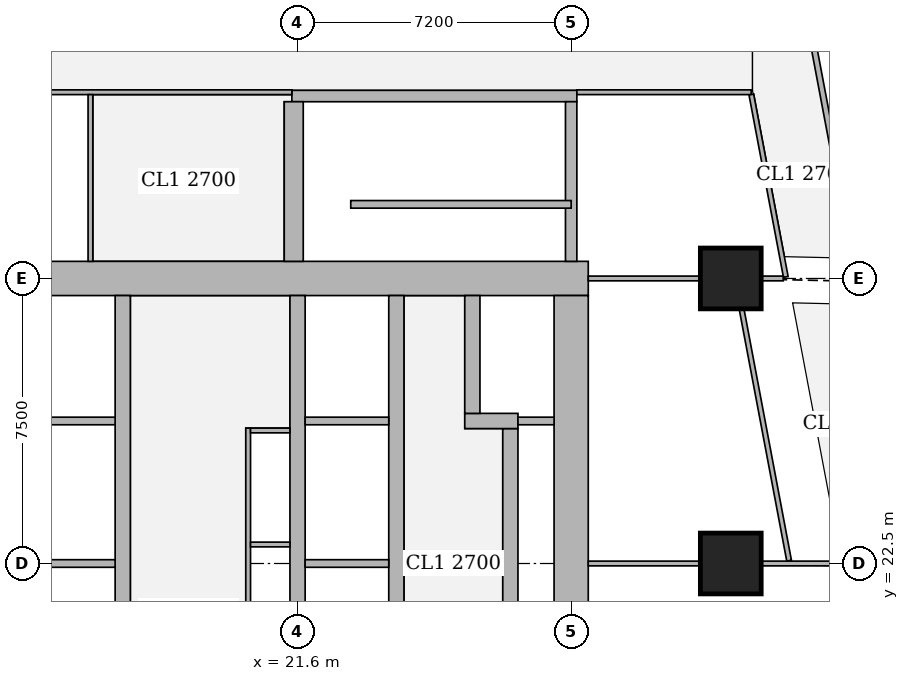
"""IFC4 building model, lengths in metres.
Left out: names, types, materials, properties, quantities, classifications, styles, units other than length and angle.
Written with IfcOpenShell. Run it as: python <this file> out.ifc"""

import sys

from ifc_helpers import new_model, si_unit, direction, frame, frame_2d, origin, origin_2d, place, context, subcontext, project, spatial, rectangle, extrude, element, fill, save


model = new_model("IFC4")
c1 = context("Model", 3, precision=1e-05, world=origin(), true_north=direction((0.0, 1.0)))
c2 = subcontext(c1, "Body", "Model", "MODEL_VIEW")
j1 = project(units=[si_unit("LENGTHUNIT", "METRE"), si_unit("PLANEANGLEUNIT", "RADIAN")], contexts=[c1])
p1 = place(None, origin())
s1 = spatial("IfcSite", under=j1, at=p1, CompositionType="ELEMENT")
p2 = place(p1, origin())
s2 = spatial("IfcBuilding", under=s1, at=p2, CompositionType="ELEMENT")
p3 = place(p2, frame((0.0, 0.0, 81.65)))
s3 = spatial("IfcBuildingStorey", under=s2, at=p3, CompositionType="ELEMENT", Elevation=81.65)
for number, where, z_axis, x_axis in (
    (1, (33.0, 22.5, 0.0), (0.0, 0.0, 1.0), (1.0, 0.0, 0.0)),
    (2, (33.0, 30.0, 0.0), (0.0, 0.0, 1.0), (1.0, 0.0, 0.0)),
):
    element("IfcColumn", number, at=place(p3, frame(where, z_axis=z_axis, x_axis=x_axis)), inside=s3, PredefinedType="COLUMN", context=c2, shape_type="SweptSolid", body=[
        extrude(rectangle(XDim=1.6, YDim=1.6, at=origin_2d()), origin(), (0.0, 0.0, 1.0), 3.75),
    ])
p4 = place(p3, frame((13.95, 30.0, 0.0), z_axis=(0.0, 0.0, 1.0), x_axis=(1.0, 0.0, 0.0)))
e3 = element("IfcWall", 3, at=p4, inside=s3, PredefinedType="SHEAR", context=c2, shape_type="SweptSolid", body=[
    extrude(rectangle(XDim=15.3, YDim=0.9, at=frame_2d((7.65, 0.0))), origin(), (0.0, 0.0, 1.0), 3.75),
])
p5 = place(p4, frame((4.45, 0.0, 0.0)))
e4 = element("IfcOpeningElement", 4, at=p5, cuts=e3, PredefinedType="OPENING", context=c2, shape_type="SweptSolid", body=[
    extrude(rectangle(XDim=1.8, YDim=2.1, at=frame_2d((0.9, 1.05))), frame((0.0, 0.46, 0.0), z_axis=(0.0, -1.0, 0.0), x_axis=(1.0, 0.0, 0.0)), (0.0, 0.0, 1.0), 0.92),
])
p6 = place(p4, frame((10.7, 0.0, 0.0)))
e5 = element("IfcOpeningElement", 5, at=p6, cuts=e3, PredefinedType="OPENING", context=c2, shape_type="SweptSolid", body=[
    extrude(rectangle(XDim=1.1, YDim=2.1, at=frame_2d((0.55, 1.05))), frame((0.0, 0.46, 0.0), z_axis=(0.0, -1.0, 0.0), x_axis=(1.0, 0.0, 0.0)), (0.0, 0.0, 1.0), 0.92),
])
p7 = place(p3, frame((28.8, 15.45, 0.0), z_axis=(0.0, 0.0, 1.0), x_axis=(0.0, 1.0, 0.0)))
e6 = element("IfcWall", 6, at=p7, inside=s3, PredefinedType="SHEAR", context=c2, shape_type="SweptSolid", body=[
    extrude(rectangle(XDim=14.1, YDim=0.9, at=frame_2d((7.05, 0.0))), origin(), (0.0, 0.0, 1.0), 3.75),
])
p8 = place(p3, frame((17.0, 15.45, 0.0), z_axis=(0.0, 0.0, 1.0), x_axis=(0.0, 1.0, 0.0)))
e7 = element("IfcWall", 7, at=p8, inside=s3, PredefinedType="SHEAR", context=c2, shape_type="SweptSolid", body=[
    extrude(rectangle(XDim=14.1, YDim=0.4, at=frame_2d((7.05, 0.0))), origin(), (0.0, 0.0, 1.0), 3.75),
])
p9 = place(p8, frame((0.875, 0.0, 0.0)))
e8 = element("IfcOpeningElement", 8, at=p9, cuts=e7, PredefinedType="OPENING", context=c2, shape_type="SweptSolid", body=[
    extrude(rectangle(XDim=1.1, YDim=2.1, at=frame_2d((0.55, 1.05))), frame((0.0, 0.21, 0.0), z_axis=(0.0, -1.0, 0.0), x_axis=(1.0, 0.0, 0.0)), (0.0, 0.0, 1.0), 0.42),
])
p10 = place(p8, frame((4.625, 0.0, 0.0)))
e9 = element("IfcOpeningElement", 9, at=p10, cuts=e7, PredefinedType="OPENING", context=c2, shape_type="SweptSolid", body=[
    extrude(rectangle(XDim=1.1, YDim=2.1, at=frame_2d((0.55, 1.05))), frame((0.0, 0.21, 0.0), z_axis=(0.0, -1.0, 0.0), x_axis=(1.0, 0.0, 0.0)), (0.0, 0.0, 1.0), 0.42),
])
p11 = place(p8, frame((8.375, 0.0, 0.0)))
e10 = element("IfcOpeningElement", 10, at=p11, cuts=e7, PredefinedType="OPENING", context=c2, shape_type="SweptSolid", body=[
    extrude(rectangle(XDim=1.1, YDim=2.1, at=frame_2d((0.55, 1.05))), frame((0.0, 0.21, 0.0), z_axis=(0.0, -1.0, 0.0), x_axis=(1.0, 0.0, 0.0)), (0.0, 0.0, 1.0), 0.42),
])
p12 = place(p8, frame((12.125, 0.0, 0.0)))
e11 = element("IfcOpeningElement", 11, at=p12, cuts=e7, PredefinedType="OPENING", context=c2, shape_type="SweptSolid", body=[
    extrude(rectangle(XDim=1.1, YDim=2.1, at=frame_2d((0.55, 1.05))), frame((0.0, 0.21, 0.0), z_axis=(0.0, -1.0, 0.0), x_axis=(1.0, 0.0, 0.0)), (0.0, 0.0, 1.0), 0.42),
])
for number, where, z_axis, x_axis in (
    (12, (21.6, 15.45, 0.0), (0.0, 0.0, 1.0), (0.0, 1.0, 0.0)),
    (13, (24.2, 15.45, 0.0), (0.0, 0.0, 1.0), (0.0, 1.0, 0.0)),
):
    element("IfcWall", number, at=place(p3, frame(where, z_axis=z_axis, x_axis=x_axis)), inside=s3, PredefinedType="SHEAR", context=c2, shape_type="SweptSolid", body=[
        extrude(rectangle(XDim=14.1, YDim=0.4, at=frame_2d((7.05, 0.0))), origin(), (0.0, 0.0, 1.0), 3.75),
    ])
p13 = place(p3, frame((27.2, 18.95, 0.0), z_axis=(0.0, 0.0, 1.0), x_axis=(0.0, 1.0, 0.0)))
e14 = element("IfcWall", 14, at=p13, inside=s3, PredefinedType="SHEAR", context=c2, shape_type="SweptSolid", body=[
    extrude(rectangle(XDim=7.1, YDim=0.4, at=frame_2d((3.55, 0.0))), origin(), (0.0, 0.0, 1.0), 3.75),
])
p14 = place(p3, frame((26.0, 26.25, 0.0), z_axis=(0.0, 0.0, 1.0), x_axis=(1.0, 0.0, 0.0)))
e15 = element("IfcWall", 15, at=p14, inside=s3, PredefinedType="SHEAR", context=c2, shape_type="SweptSolid", body=[
    extrude(rectangle(XDim=1.4, YDim=0.4, at=frame_2d((0.7, 0.0))), origin(), (0.0, 0.0, 1.0), 3.75),
])
p15 = place(p3, frame((26.2, 26.45, 0.0), z_axis=(0.0, 0.0, 1.0), x_axis=(0.0, 1.0, 0.0)))
e16 = element("IfcWall", 16, at=p15, inside=s3, PredefinedType="SHEAR", context=c2, shape_type="SweptSolid", body=[
    extrude(rectangle(XDim=3.1, YDim=0.4, at=frame_2d((1.55, 0.0))), origin(), (0.0, 0.0, 1.0), 3.75),
])
p16 = place(p15, frame((1.075, 0.0, 0.0)))
e17 = element("IfcOpeningElement", 17, at=p16, cuts=e16, PredefinedType="OPENING", context=c2, shape_type="SweptSolid", body=[
    extrude(rectangle(XDim=1.2, YDim=2.1, at=frame_2d((0.6, 1.05))), frame((0.0, 0.21, 0.0), z_axis=(0.0, -1.0, 0.0), x_axis=(1.0, 0.0, 0.0)), (0.0, 0.0, 1.0), 0.42),
])
p17 = place(p3, frame((21.45, 34.8, 0.0), z_axis=(0.0, 0.0, 1.0), x_axis=(1.0, 0.0, 0.0)))
e18 = element("IfcWall", 18, at=p17, inside=s3, PredefinedType="SHEAR", context=c2, shape_type="SweptSolid", body=[
    extrude(rectangle(XDim=7.5, YDim=0.3, at=frame_2d((3.75, 0.0))), origin(), (0.0, 0.0, 1.0), 3.75),
])
p18 = place(p17, frame((0.5, 0.0, 0.0)))
e19 = element("IfcOpeningElement", 19, at=p18, cuts=e18, PredefinedType="OPENING", context=c2, shape_type="SweptSolid", body=[
    extrude(rectangle(XDim=1.1, YDim=2.1, at=frame_2d((0.55, 1.05))), frame((0.0, 0.16, 0.0), z_axis=(0.0, -1.0, 0.0), x_axis=(1.0, 0.0, 0.0)), (0.0, 0.0, 1.0), 0.32),
])
p19 = place(p3, frame((21.5, 30.45, 0.0), z_axis=(0.0, 0.0, 1.0), x_axis=(0.0, 1.0, 0.0)))
e20 = element("IfcWall", 20, at=p19, inside=s3, PredefinedType="SHEAR", context=c2, shape_type="SweptSolid", body=[
    extrude(rectangle(XDim=4.2, YDim=0.5, at=frame_2d((2.1, 0.0))), origin(), (0.0, 0.0, 1.0), 3.75),
])
p20 = place(p3, frame((28.8, 30.45, 0.0), z_axis=(0.0, 0.0, 1.0), x_axis=(0.0, 1.0, 0.0)))
e21 = element("IfcWall", 21, at=p20, inside=s3, PredefinedType="SHEAR", context=c2, shape_type="SweptSolid", body=[
    extrude(rectangle(XDim=4.2, YDim=0.3, at=frame_2d((2.1, 0.0))), origin(), (0.0, 0.0, 1.0), 3.75),
])
p21 = place(p3, frame((33.382, 45.65, 0.0), z_axis=(0.0, 0.0, 1.0), x_axis=(0.185593544777, -0.982626600565, 0.0)))
e22 = element("IfcWall", 22, at=p21, inside=s3, PredefinedType="SOLIDWALL", context=c2, shape_type="SweptSolid", body=[
    extrude(rectangle(XDim=47.118, YDim=0.15, at=frame_2d((23.559, 0.0))), origin(), (0.0, 0.0, 1.0), 2.2),
])
p22 = place(p21, frame((19.054, 0.0, 0.0)))
e23 = element("IfcOpeningElement", 23, at=p22, cuts=e22, PredefinedType="OPENING", context=c2, shape_type="SweptSolid", body=[
    extrude(rectangle(XDim=1.0, YDim=2.1, at=frame_2d((0.5, 1.05))), frame((0.0, 0.085, 0.0), z_axis=(0.0, -1.0, 0.0), x_axis=(1.0, 0.0, 0.0)), (0.0, 0.0, 1.0), 0.17),
])
p23 = place(p21, frame((22.87, 0.0, 0.0)))
e24 = element("IfcOpeningElement", 24, at=p23, cuts=e22, PredefinedType="OPENING", context=c2, shape_type="SweptSolid", body=[
    extrude(rectangle(XDim=1.0, YDim=2.1, at=frame_2d((0.5, 1.05))), frame((0.0, 0.085, 0.0), z_axis=(0.0, -1.0, 0.0), x_axis=(1.0, 0.0, 0.0)), (0.0, 0.0, 1.0), 0.17),
])
p24 = place(p21, frame((33.833, 0.0, 0.0)))
e25 = element("IfcOpeningElement", 25, at=p24, cuts=e22, PredefinedType="OPENING", context=c2, shape_type="SweptSolid", body=[
    extrude(rectangle(XDim=1.0, YDim=2.1, at=frame_2d((0.5, 1.05))), frame((0.0, 0.085, 0.0), z_axis=(0.0, -1.0, 0.0), x_axis=(1.0, 0.0, 0.0)), (0.0, 0.0, 1.0), 0.17),
])
p25 = place(p3, frame((10.163, 34.9, 0.0), z_axis=(0.0, 0.0, 1.0), x_axis=(1.0, 0.0, 0.0)))
e26 = element("IfcWall", 26, at=p25, inside=s3, PredefinedType="PARTITIONING", context=c2, shape_type="SweptSolid", body=[
    extrude(rectangle(XDim=11.287, YDim=0.125, at=frame_2d((5.644, 0.0))), origin(), (0.0, 0.0, 1.0), 3.5),
])
p26 = place(p25, frame((7.737, 0.0, 0.0)))
e27 = element("IfcOpeningElement", 27, at=p26, cuts=e26, PredefinedType="OPENING", context=c2, shape_type="SweptSolid", body=[
    extrude(rectangle(XDim=1.8, YDim=2.1, at=frame_2d((0.9, 1.05))), frame((0.0, 0.073, 0.0), z_axis=(0.0, -1.0, 0.0), x_axis=(1.0, 0.0, 0.0)), (0.0, 0.0, 1.0), 0.145),
])
p27 = place(p3, frame((16.15, 30.45, 0.0), z_axis=(0.0, 0.0, 1.0), x_axis=(0.0, 1.0, 0.0)))
e28 = element("IfcWall", 28, at=p27, inside=s3, PredefinedType="PARTITIONING", context=c2, shape_type="SweptSolid", body=[
    extrude(rectangle(XDim=4.387, YDim=0.125, at=frame_2d((2.193, 0.0))), origin(), (0.0, 0.0, 1.0), 3.5),
])
p28 = place(p27, frame((1.75, 0.0, 0.0)))
e29 = element("IfcOpeningElement", 29, at=p28, cuts=e28, PredefinedType="OPENING", context=c2, shape_type="SweptSolid", body=[
    extrude(rectangle(XDim=1.0, YDim=2.1, at=frame_2d((0.5, 1.05))), frame((0.0, 0.073, 0.0), z_axis=(0.0, -1.0, 0.0), x_axis=(1.0, 0.0, 0.0)), (0.0, 0.0, 1.0), 0.145),
])
p29 = place(p3, frame((28.95, 34.9, 0.0), z_axis=(0.0, 0.0, 1.0), x_axis=(1.0, 0.0, 0.0)))
e30 = element("IfcWall", 30, at=p29, inside=s3, PredefinedType="PARTITIONING", context=c2, shape_type="SweptSolid", body=[
    extrude(rectangle(XDim=4.588, YDim=0.125, at=frame_2d((2.294, 0.0))), origin(), (0.0, 0.0, 1.0), 3.5),
])
p30 = place(p3, frame((34.448, 30.04, 0.0), z_axis=(0.0, 0.0, 1.0), x_axis=(-0.185749459238, 0.982597139418, 0.0)))
e31 = element("IfcWall", 31, at=p30, inside=s3, PredefinedType="PARTITIONING", context=c2, shape_type="SweptSolid", body=[
    extrude(rectangle(XDim=4.883, YDim=0.125, at=frame_2d((2.441, 0.0))), origin(), (0.0, 0.0, 1.0), 2.5),
])
p31 = place(p30, frame((1.05, 0.0, 0.0)))
e32 = element("IfcOpeningElement", 32, at=p31, cuts=e31, PredefinedType="OPENING", context=c2, shape_type="SweptSolid", body=[
    extrude(rectangle(XDim=1.0, YDim=2.1, at=frame_2d((0.5, 1.05))), frame((0.0, 0.073, 0.0), z_axis=(0.0, -1.0, 0.0), x_axis=(1.0, 0.0, 0.0)), (0.0, 0.0, 1.0), 0.145),
])
p32 = place(p3, frame((34.535, 22.574, 0.0), z_axis=(0.0, 0.0, 1.0), x_axis=(-0.185591596381, 0.982626968566, 0.0)))
e33 = element("IfcWall", 33, at=p32, inside=s3, PredefinedType="PARTITIONING", context=c2, shape_type="SweptSolid", body=[
    extrude(rectangle(XDim=6.73, YDim=0.125, at=frame_2d((3.365, 0.0))), origin(), (0.0, 0.0, 1.0), 2.5),
])
p33 = place(p32, frame((3.241, 0.0, 0.0)))
e34 = element("IfcOpeningElement", 34, at=p33, cuts=e33, PredefinedType="OPENING", context=c2, shape_type="SweptSolid", body=[
    extrude(rectangle(XDim=1.0, YDim=2.1, at=frame_2d((0.5, 1.05))), frame((0.0, 0.073, 0.0), z_axis=(0.0, -1.0, 0.0), x_axis=(1.0, 0.0, 0.0)), (0.0, 0.0, 1.0), 0.145),
])
p34 = place(p3, frame((29.25, 22.5, 0.0), z_axis=(0.0, 0.0, 1.0), x_axis=(1.0, 0.0, 0.0)))
e35 = element("IfcWall", 35, at=p34, inside=s3, PredefinedType="PARTITIONING", context=c2, shape_type="SweptSolid", body=[
    extrude(rectangle(XDim=2.949, YDim=0.125, at=frame_2d((1.475, 0.0))), origin(), (0.0, 0.0, 1.0), 3.5),
])
p35 = place(p3, frame((33.801, 22.5, 0.0), z_axis=(0.0, 0.0, 1.0), x_axis=(1.0, 0.0, 0.0)))
e36 = element("IfcWall", 36, at=p35, inside=s3, PredefinedType="PARTITIONING", context=c2, shape_type="SweptSolid", body=[
    extrude(rectangle(XDim=2.009, YDim=0.125, at=frame_2d((1.004, 0.0))), origin(), (0.0, 0.0, 1.0), 2.5),
])
p36 = place(p3, frame((29.25, 30.0, 0.0), z_axis=(0.0, 0.0, 1.0), x_axis=(1.0, 0.0, 0.0)))
e37 = element("IfcWall", 37, at=p36, inside=s3, PredefinedType="PARTITIONING", context=c2, shape_type="SweptSolid", body=[
    extrude(rectangle(XDim=2.949, YDim=0.125, at=frame_2d((1.475, 0.0))), origin(), (0.0, 0.0, 1.0), 3.5),
])
p37 = place(p3, frame((33.801, 30.0, 0.0), z_axis=(0.0, 0.0, 1.0), x_axis=(1.0, 0.0, 0.0)))
e38 = element("IfcWall", 38, at=p37, inside=s3, PredefinedType="PARTITIONING", context=c2, shape_type="SweptSolid", body=[
    extrude(rectangle(XDim=0.579, YDim=0.125, at=frame_2d((0.29, 0.0))), origin(), (0.0, 0.0, 1.0), 2.5),
])
p38 = place(p3, frame((20.3, 16.438, 0.0), z_axis=(0.0, 0.0, 1.0), x_axis=(0.0, 1.0, 0.0)))
e39 = element("IfcWall", 39, at=p38, inside=s3, PredefinedType="PARTITIONING", context=c2, shape_type="SweptSolid", body=[
    extrude(rectangle(XDim=9.624, YDim=0.125, at=frame_2d((4.812, 0.0))), origin(), (0.0, 0.0, 1.0), 3.5),
])
p39 = place(p38, frame((0.937, 0.0, 0.0)))
e40 = element("IfcOpeningElement", 40, at=p39, cuts=e39, PredefinedType="OPENING", context=c2, shape_type="SweptSolid", body=[
    extrude(rectangle(XDim=1.0, YDim=2.1, at=frame_2d((0.5, 1.05))), frame((0.0, 0.073, 0.0), z_axis=(0.0, -1.0, 0.0), x_axis=(1.0, 0.0, 0.0)), (0.0, 0.0, 1.0), 0.145),
])
p40 = place(p38, frame((4.187, 0.0, 0.0)))
e41 = element("IfcOpeningElement", 41, at=p40, cuts=e39, PredefinedType="OPENING", context=c2, shape_type="SweptSolid", body=[
    extrude(rectangle(XDim=1.0, YDim=2.1, at=frame_2d((0.5, 1.05))), frame((0.0, 0.073, 0.0), z_axis=(0.0, -1.0, 0.0), x_axis=(1.0, 0.0, 0.0)), (0.0, 0.0, 1.0), 0.145),
])
p41 = place(p38, frame((7.562, 0.0, 0.0)))
e42 = element("IfcOpeningElement", 42, at=p41, cuts=e39, PredefinedType="OPENING", context=c2, shape_type="SweptSolid", body=[
    extrude(rectangle(XDim=1.0, YDim=2.1, at=frame_2d((0.5, 1.05))), frame((0.0, 0.073, 0.0), z_axis=(0.0, -1.0, 0.0), x_axis=(1.0, 0.0, 0.0)), (0.0, 0.0, 1.0), 0.145),
])
for number, where, z_axis, x_axis in (
    (43, (20.363, 26.0, 0.0), (0.0, 0.0, 1.0), (1.0, 0.0, 0.0)),
    (44, (20.363, 23.0, 0.0), (0.0, 0.0, 1.0), (1.0, 0.0, 0.0)),
):
    element("IfcWall", number, at=place(p3, frame(where, z_axis=z_axis, x_axis=x_axis)), inside=s3, PredefinedType="PARTITIONING", context=c2, shape_type="SweptSolid", body=[
        extrude(rectangle(XDim=1.037, YDim=0.125, at=frame_2d((0.519, 0.0))), origin(), (0.0, 0.0, 1.0), 3.5),
    ])
p42 = place(p3, frame((23.0, 31.95, 0.0), z_axis=(0.0, 0.0, 1.0), x_axis=(1.0, 0.0, 0.0)))
e45 = element("IfcWall", 45, at=p42, inside=s3, PredefinedType="SHEAR", context=c2, shape_type="SweptSolid", body=[
    extrude(rectangle(XDim=5.8, YDim=0.2, at=frame_2d((2.9, 0.0))), origin(), (0.0, 0.0, 1.0), 3.75),
])
p43 = place(p3, frame((14.85, 22.5, 0.0), z_axis=(0.0, 0.0, 1.0), x_axis=(1.0, 0.0, 0.0)))
e46 = element("IfcWall", 46, at=p43, inside=s3, PredefinedType="SOLIDWALL", context=c2, shape_type="SweptSolid", body=[
    extrude(rectangle(XDim=1.95, YDim=0.2, at=frame_2d((0.975, 0.0))), origin(), (0.0, 0.0, 1.0), 3.5),
])
p44 = place(p3, frame((21.8, 22.5, 0.0), z_axis=(0.0, 0.0, 1.0), x_axis=(1.0, 0.0, 0.0)))
e47 = element("IfcWall", 47, at=p44, inside=s3, PredefinedType="SOLIDWALL", context=c2, shape_type="SweptSolid", body=[
    extrude(rectangle(XDim=2.2, YDim=0.2, at=frame_2d((1.1, 0.0))), origin(), (0.0, 0.0, 1.0), 3.5),
])
p45 = place(p3, frame((14.85, 26.25, 0.0), z_axis=(0.0, 0.0, 1.0), x_axis=(1.0, 0.0, 0.0)))
e48 = element("IfcWall", 48, at=p45, inside=s3, PredefinedType="SOLIDWALL", context=c2, shape_type="SweptSolid", body=[
    extrude(rectangle(XDim=1.95, YDim=0.2, at=frame_2d((0.975, 0.0))), origin(), (0.0, 0.0, 1.0), 3.5),
])
p46 = place(p3, frame((21.8, 26.25, 0.0), z_axis=(0.0, 0.0, 1.0), x_axis=(1.0, 0.0, 0.0)))
e49 = element("IfcWall", 49, at=p46, inside=s3, PredefinedType="SOLIDWALL", context=c2, shape_type="SweptSolid", body=[
    extrude(rectangle(XDim=2.2, YDim=0.2, at=frame_2d((1.1, 0.0))), origin(), (0.0, 0.0, 1.0), 3.5),
])
p47 = place(p3, frame((27.4, 26.25, 0.0), z_axis=(0.0, 0.0, 1.0), x_axis=(1.0, 0.0, 0.0)))
e50 = element("IfcWall", 50, at=p47, inside=s3, PredefinedType="SOLIDWALL", context=c2, shape_type="SweptSolid", body=[
    extrude(rectangle(XDim=0.95, YDim=0.2, at=frame_2d((0.475, 0.0))), origin(), (0.0, 0.0, 1.0), 3.5),
])
p48 = place(p28, origin())
e51 = element("IfcDoor", 51, at=p48, inside=s3, OperationType="SINGLE_SWING_RIGHT", PredefinedType="DOOR", context=c2, shape_type="SweptSolid", body=[
    extrude(rectangle(XDim=1.0, YDim=2.1, at=frame_2d((0.5, 1.05))), frame((0.0, 0.025, 0.0), z_axis=(0.0, -1.0, 0.0), x_axis=(1.0, 0.0, 0.0)), (0.0, 0.0, 1.0), 0.05),
])
fill(e29, e51)
p49 = place(p26, origin())
e52 = element("IfcDoor", 52, at=p49, inside=s3, OperationType="DOUBLE_DOOR_SINGLE_SWING", PredefinedType="DOOR", context=c2, shape_type="SweptSolid", body=[
    extrude(rectangle(XDim=1.8, YDim=2.1, at=frame_2d((0.9, 1.05))), frame((0.0, 0.025, 0.0), z_axis=(0.0, -1.0, 0.0), x_axis=(1.0, 0.0, 0.0)), (0.0, 0.0, 1.0), 0.05),
])
fill(e27, e52)
p50 = place(p33, origin())
e53 = element("IfcDoor", 53, at=p50, inside=s3, OperationType="SINGLE_SWING_RIGHT", PredefinedType="DOOR", context=c2, shape_type="SweptSolid", body=[
    extrude(rectangle(XDim=1.0, YDim=2.1, at=frame_2d((0.5, 1.05))), frame((0.0, 0.025, 0.0), z_axis=(0.0, -1.0, 0.0), x_axis=(1.0, 0.0, 0.0)), (0.0, 0.0, 1.0), 0.05),
])
fill(e34, e53)
p51 = place(p31, origin())
e54 = element("IfcDoor", 54, at=p51, inside=s3, OperationType="SINGLE_SWING_LEFT", PredefinedType="DOOR", context=c2, shape_type="SweptSolid", body=[
    extrude(rectangle(XDim=1.0, YDim=2.1, at=frame_2d((0.5, 1.05))), frame((0.0, 0.025, 0.0), z_axis=(0.0, -1.0, 0.0), x_axis=(1.0, 0.0, 0.0)), (0.0, 0.0, 1.0), 0.05),
])
fill(e32, e54)
p52 = place(p40, origin())
e55 = element("IfcDoor", 55, at=p52, inside=s3, OperationType="SINGLE_SWING_RIGHT", PredefinedType="DOOR", context=c2, shape_type="SweptSolid", body=[
    extrude(rectangle(XDim=1.0, YDim=2.1, at=frame_2d((0.5, 1.05))), frame((0.0, 0.025, 0.0), z_axis=(0.0, -1.0, 0.0), x_axis=(1.0, 0.0, 0.0)), (0.0, 0.0, 1.0), 0.05),
])
fill(e41, e55)
p53 = place(p41, origin())
e56 = element("IfcDoor", 56, at=p53, inside=s3, OperationType="SINGLE_SWING_LEFT", PredefinedType="DOOR", context=c2, shape_type="SweptSolid", body=[
    extrude(rectangle(XDim=1.0, YDim=2.1, at=frame_2d((0.5, 1.05))), frame((0.0, 0.025, 0.0), z_axis=(0.0, -1.0, 0.0), x_axis=(1.0, 0.0, 0.0)), (0.0, 0.0, 1.0), 0.05),
])
fill(e42, e56)
p54 = place(p5, origin())
e57 = element("IfcDoor", 57, at=p54, inside=s3, OperationType="DOUBLE_DOOR_SINGLE_SWING", PredefinedType="DOOR", context=c2, shape_type="SweptSolid", body=[
    extrude(rectangle(XDim=1.8, YDim=2.1, at=frame_2d((0.9, 1.05))), frame((0.0, 0.025, 0.0), z_axis=(0.0, -1.0, 0.0), x_axis=(1.0, 0.0, 0.0)), (0.0, 0.0, 1.0), 0.05),
])
fill(e4, e57)
p55 = place(p6, origin())
e58 = element("IfcDoor", 58, at=p55, inside=s3, OperationType="SINGLE_SWING_LEFT", PredefinedType="DOOR", context=c2, shape_type="SweptSolid", body=[
    extrude(rectangle(XDim=1.1, YDim=2.1, at=frame_2d((0.55, 1.05))), frame((0.0, 0.025, 0.0), z_axis=(0.0, -1.0, 0.0), x_axis=(1.0, 0.0, 0.0)), (0.0, 0.0, 1.0), 0.05),
])
fill(e5, e58)
p56 = place(p16, origin())
e59 = element("IfcDoor", 59, at=p56, inside=s3, OperationType="DOUBLE_DOOR_SLIDING", PredefinedType="DOOR", context=c2, shape_type="SweptSolid", body=[
    extrude(rectangle(XDim=1.2, YDim=2.1, at=frame_2d((0.6, 1.05))), frame((0.0, 0.025, 0.0), z_axis=(0.0, -1.0, 0.0), x_axis=(1.0, 0.0, 0.0)), (0.0, 0.0, 1.0), 0.05),
])
fill(e17, e59)
p57 = place(p11, origin())
e60 = element("IfcDoor", 60, at=p57, inside=s3, OperationType="DOUBLE_DOOR_SLIDING", PredefinedType="DOOR", context=c2, shape_type="SweptSolid", body=[
    extrude(rectangle(XDim=1.1, YDim=2.1, at=frame_2d((0.55, 1.05))), frame((0.0, 0.025, 0.0), z_axis=(0.0, -1.0, 0.0), x_axis=(1.0, 0.0, 0.0)), (0.0, 0.0, 1.0), 0.05),
])
fill(e10, e60)
p58 = place(p12, origin())
e61 = element("IfcDoor", 61, at=p58, inside=s3, OperationType="DOUBLE_DOOR_SLIDING", PredefinedType="DOOR", context=c2, shape_type="SweptSolid", body=[
    extrude(rectangle(XDim=1.1, YDim=2.1, at=frame_2d((0.55, 1.05))), frame((0.0, 0.025, 0.0), z_axis=(0.0, -1.0, 0.0), x_axis=(1.0, 0.0, 0.0)), (0.0, 0.0, 1.0), 0.05),
])
fill(e11, e61)
p59 = place(p18, origin())
e62 = element("IfcDoor", 62, at=p59, inside=s3, OperationType="SINGLE_SWING_RIGHT", PredefinedType="DOOR", context=c2, shape_type="SweptSolid", body=[
    extrude(rectangle(XDim=1.1, YDim=2.1, at=frame_2d((0.55, 1.05))), frame((0.0, 0.025, 0.0), z_axis=(0.0, -1.0, 0.0), x_axis=(1.0, 0.0, 0.0)), (0.0, 0.0, 1.0), 0.05),
])
fill(e19, e62)
save(model, sys.argv[1])
